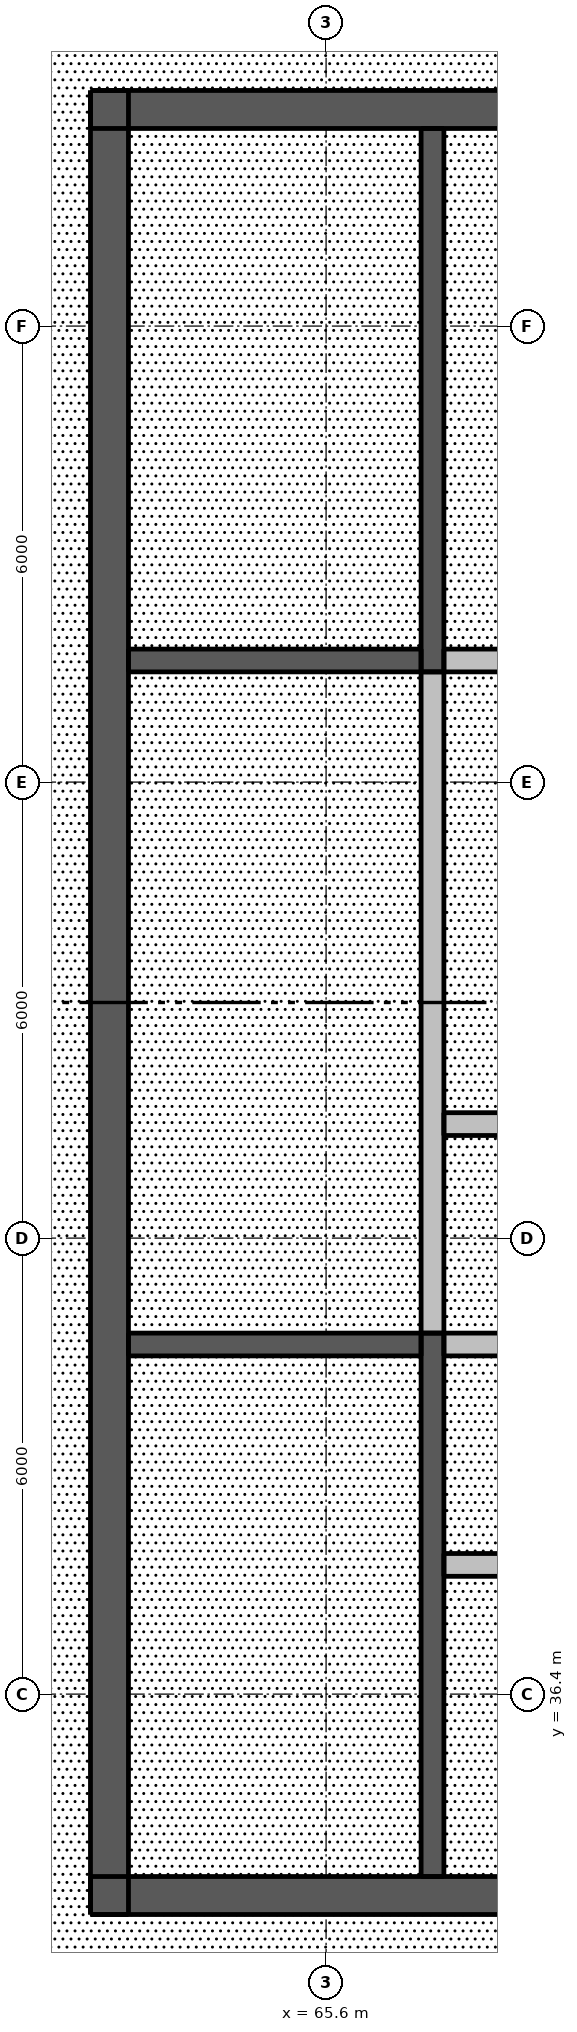
"""IFC4 building model, lengths in metres.
Left out: names, types, materials, properties, quantities, classifications, styles, units other than length and angle.
Written with IfcOpenShell. Run it as: python <this file> out.ifc"""

import sys

from ifc_helpers import new_model, si_unit, direction, frame, frame_2d, origin, place, context, subcontext, project, spatial, rectangle, extrude, element, fill, save


model = new_model("IFC4")
c1 = context("Model", 3, precision=1e-05, world=origin(), true_north=direction((0.0, 1.0)))
c2 = subcontext(c1, "Body", "Model", "MODEL_VIEW")
j1 = project(units=[si_unit("LENGTHUNIT", "METRE"), si_unit("PLANEANGLEUNIT", "RADIAN")], contexts=[c1])
p1 = place(None, origin())
s1 = spatial("IfcSite", under=j1, at=p1, CompositionType="ELEMENT")
p2 = place(p1, origin())
s2 = spatial("IfcBuilding", under=s1, at=p2, CompositionType="ELEMENT")
p3 = place(p2, frame((0.0, 0.0, 298.0)))
s3 = spatial("IfcBuildingStorey", under=s2, at=p3, CompositionType="ELEMENT", Elevation=298.0)
p4 = place(p3, frame((62.5, 33.75, 0.0), z_axis=(0.0, 0.0, 1.0), x_axis=(1.0, 0.0, 0.0)))
e1 = element("IfcWall", 1, at=p4, inside=s3, PredefinedType="SHEAR", context=c2, shape_type="SweptSolid", body=[
    extrude(rectangle(XDim=24.0, YDim=0.5, at=frame_2d((12.0, 0.0))), origin(), (0.0, 0.0, 1.0), 3.3),
])
p5 = place(p4, frame((1.875, 0.0, 0.0)))
e2 = element("IfcOpeningElement", 2, at=p5, cuts=e1, PredefinedType="OPENING", context=c2, shape_type="SweptSolid", body=[
    extrude(rectangle(XDim=1.1, YDim=2.1, at=frame_2d((0.55, 1.05))), frame((0.0, 0.26, 0.0), z_axis=(0.0, -1.0, 0.0), x_axis=(1.0, 0.0, 0.0)), (0.0, 0.0, 1.0), 0.52),
])
p6 = place(p4, frame((21.025, 0.0, 0.0)))
e3 = element("IfcOpeningElement", 3, at=p6, cuts=e1, PredefinedType="OPENING", context=c2, shape_type="SweptSolid", body=[
    extrude(rectangle(XDim=1.1, YDim=2.1, at=frame_2d((0.55, 1.05))), frame((0.0, 0.26, 0.0), z_axis=(0.0, -1.0, 0.0), x_axis=(1.0, 0.0, 0.0)), (0.0, 0.0, 1.0), 0.52),
])
p7 = place(p4, frame((11.55, 0.0, 0.0)))
e4 = element("IfcOpeningElement", 4, at=p7, cuts=e1, PredefinedType="OPENING", context=c2, shape_type="SweptSolid", body=[
    extrude(rectangle(XDim=0.9, YDim=2.1, at=frame_2d((0.45, 1.05))), frame((0.0, 0.26, 0.0), z_axis=(0.0, -1.0, 0.0), x_axis=(1.0, 0.0, 0.0)), (0.0, 0.0, 1.0), 0.52),
])
p8 = place(p3, frame((62.5, 57.25, 0.0), z_axis=(0.0, 0.0, 1.0), x_axis=(1.0, 0.0, 0.0)))
e5 = element("IfcWall", 5, at=p8, inside=s3, PredefinedType="SHEAR", context=c2, shape_type="SweptSolid", body=[
    extrude(rectangle(XDim=24.0, YDim=0.5, at=frame_2d((12.0, 0.0))), origin(), (0.0, 0.0, 1.0), 3.3),
])
p9 = place(p8, frame((21.025, 0.0, 0.0)))
e6 = element("IfcOpeningElement", 6, at=p9, cuts=e5, PredefinedType="OPENING", context=c2, shape_type="SweptSolid", body=[
    extrude(rectangle(XDim=1.1, YDim=2.1, at=frame_2d((0.55, 1.05))), frame((0.0, 0.26, 0.0), z_axis=(0.0, -1.0, 0.0), x_axis=(1.0, 0.0, 0.0)), (0.0, 0.0, 1.0), 0.52),
])
p10 = place(p8, frame((1.875, 0.0, 0.0)))
e7 = element("IfcOpeningElement", 7, at=p10, cuts=e5, PredefinedType="OPENING", context=c2, shape_type="SweptSolid", body=[
    extrude(rectangle(XDim=1.1, YDim=2.1, at=frame_2d((0.55, 1.05))), frame((0.0, 0.26, 0.0), z_axis=(0.0, -1.0, 0.0), x_axis=(1.0, 0.0, 0.0)), (0.0, 0.0, 1.0), 0.52),
])
p11 = place(p8, frame((11.55, 0.0, 0.0)))
e8 = element("IfcOpeningElement", 8, at=p11, cuts=e5, PredefinedType="OPENING", context=c2, shape_type="SweptSolid", body=[
    extrude(rectangle(XDim=0.9, YDim=2.1, at=frame_2d((0.45, 1.05))), frame((0.0, 0.26, 0.0), z_axis=(0.0, -1.0, 0.0), x_axis=(1.0, 0.0, 0.0)), (0.0, 0.0, 1.0), 0.52),
])
p12 = place(p3, frame((62.75, 33.5, 0.0), z_axis=(0.0, 0.0, 1.0), x_axis=(0.0, 1.0, 0.0)))
e9 = element("IfcWall", 9, at=p12, inside=s3, PredefinedType="SHEAR", context=c2, shape_type="SweptSolid", body=[
    extrude(rectangle(XDim=24.0, YDim=0.5, at=frame_2d((12.0, 0.0))), origin(), (0.0, 0.0, 1.0), 3.3),
])
p13 = place(p12, frame((11.55, 0.0, 0.0)))
e10 = element("IfcOpeningElement", 10, at=p13, cuts=e9, PredefinedType="OPENING", context=c2, shape_type="SweptSolid", body=[
    extrude(rectangle(XDim=0.9, YDim=2.1, at=frame_2d((0.45, 1.05))), frame((0.0, 0.26, 0.0), z_axis=(0.0, -1.0, 0.0), x_axis=(1.0, 0.0, 0.0)), (0.0, 0.0, 1.0), 0.52),
])
p14 = place(p3, frame((67.0, 34.0, 0.0), z_axis=(0.0, 0.0, 1.0), x_axis=(0.0, 1.0, 0.0)))
e11 = element("IfcWall", 11, at=p14, inside=s3, PredefinedType="SHEAR", context=c2, shape_type="SweptSolid", body=[
    extrude(rectangle(XDim=7.15, YDim=0.3, at=frame_2d((3.575, 0.0))), origin(), (0.0, 0.0, 1.0), 3.3),
])
p15 = place(p14, frame((0.2, 0.0, 0.0)))
e12 = element("IfcOpeningElement", 12, at=p15, cuts=e11, PredefinedType="OPENING", context=c2, shape_type="SweptSolid", body=[
    extrude(rectangle(XDim=1.1, YDim=2.1, at=frame_2d((0.55, 1.05))), frame((0.0, 0.16, 0.0), z_axis=(0.0, -1.0, 0.0), x_axis=(1.0, 0.0, 0.0)), (0.0, 0.0, 1.0), 0.32),
])
p16 = place(p3, frame((67.0, 41.15, 0.0), z_axis=(0.0, 0.0, 1.0), x_axis=(0.0, 1.0, 0.0)))
e13 = element("IfcWall", 13, at=p16, inside=s3, PredefinedType="PARTITIONING", context=c2, shape_type="SweptSolid", body=[
    extrude(rectangle(XDim=8.7, YDim=0.3, at=frame_2d((4.35, 0.0))), origin(), (0.0, 0.0, 1.0), 3.3),
])
p17 = place(p16, frame((3.9, 0.0, 0.0)))
e14 = element("IfcOpeningElement", 14, at=p17, cuts=e13, PredefinedType="OPENING", context=c2, shape_type="SweptSolid", body=[
    extrude(rectangle(XDim=0.9, YDim=2.1, at=frame_2d((0.45, 1.05))), frame((0.0, 0.16, 0.0), z_axis=(0.0, -1.0, 0.0), x_axis=(1.0, 0.0, 0.0)), (0.0, 0.0, 1.0), 0.32),
])
p18 = place(p3, frame((67.0, 49.85, 0.0), z_axis=(0.0, 0.0, 1.0), x_axis=(0.0, 1.0, 0.0)))
e15 = element("IfcWall", 15, at=p18, inside=s3, PredefinedType="SHEAR", context=c2, shape_type="SweptSolid", body=[
    extrude(rectangle(XDim=7.15, YDim=0.3, at=frame_2d((3.575, 0.0))), origin(), (0.0, 0.0, 1.0), 3.3),
])
p19 = place(p18, frame((5.85, 0.0, 0.0)))
e16 = element("IfcOpeningElement", 16, at=p19, cuts=e15, PredefinedType="OPENING", context=c2, shape_type="SweptSolid", body=[
    extrude(rectangle(XDim=1.1, YDim=2.1, at=frame_2d((0.55, 1.05))), frame((0.0, 0.16, 0.0), z_axis=(0.0, -1.0, 0.0), x_axis=(1.0, 0.0, 0.0)), (0.0, 0.0, 1.0), 0.32),
])
for number, where, z_axis, x_axis in (
    (17, (63.0, 41.0, 0.0), (0.0, 0.0, 1.0), (1.0, 0.0, 0.0)),
    (18, (63.0, 50.0, 0.0), (0.0, 0.0, 1.0), (1.0, 0.0, 0.0)),
):
    element("IfcWall", number, at=place(p3, frame(where, z_axis=z_axis, x_axis=x_axis)), inside=s3, PredefinedType="SHEAR", context=c2, shape_type="SweptSolid", body=[
        extrude(rectangle(XDim=3.85, YDim=0.3, at=frame_2d((1.925, 0.0))), origin(), (0.0, 0.0, 1.0), 3.3),
    ])
p20 = place(p3, frame((67.15, 50.0, 0.0), z_axis=(0.0, 0.0, 1.0), x_axis=(1.0, 0.0, 0.0)))
e19 = element("IfcWall", 19, at=p20, inside=s3, PredefinedType="PARTITIONING", context=c2, shape_type="SweptSolid", body=[
    extrude(rectangle(XDim=14.7, YDim=0.3, at=frame_2d((7.35, 0.0))), origin(), (0.0, 0.0, 1.0), 3.3),
])
p21 = place(p20, frame((6.9, 0.0, 0.0)))
e20 = element("IfcOpeningElement", 20, at=p21, cuts=e19, PredefinedType="OPENING", context=c2, shape_type="SweptSolid", body=[
    extrude(rectangle(XDim=0.9, YDim=2.1, at=frame_2d((0.45, 1.05))), frame((0.0, 0.16, 0.0), z_axis=(0.0, -1.0, 0.0), x_axis=(1.0, 0.0, 0.0)), (0.0, 0.0, 1.0), 0.32),
])
p22 = place(p3, frame((67.15, 43.9, 0.0), z_axis=(0.0, 0.0, 1.0), x_axis=(1.0, 0.0, 0.0)))
e21 = element("IfcWall", 21, at=p22, inside=s3, PredefinedType="PARTITIONING", context=c2, shape_type="SweptSolid", body=[
    extrude(rectangle(XDim=4.85, YDim=0.3, at=frame_2d((2.425, 0.0))), origin(), (0.0, 0.0, 1.0), 3.3),
])
p23 = place(p22, frame((1.9, 0.0, 0.0)))
e22 = element("IfcOpeningElement", 22, at=p23, cuts=e21, PredefinedType="OPENING", context=c2, shape_type="SweptSolid", body=[
    extrude(rectangle(XDim=0.9, YDim=2.1, at=frame_2d((0.45, 1.05))), frame((0.0, 0.16, 0.0), z_axis=(0.0, -1.0, 0.0), x_axis=(1.0, 0.0, 0.0)), (0.0, 0.0, 1.0), 0.32),
])
p24 = place(p3, frame((67.15, 38.1, 0.0), z_axis=(0.0, 0.0, 1.0), x_axis=(1.0, 0.0, 0.0)))
e23 = element("IfcWall", 23, at=p24, inside=s3, PredefinedType="PARTITIONING", context=c2, shape_type="SweptSolid", body=[
    extrude(rectangle(XDim=7.2, YDim=0.3, at=frame_2d((3.6, 0.0))), origin(), (0.0, 0.0, 1.0), 3.3),
])
p25 = place(p24, frame((0.55, 0.0, 0.0)))
e24 = element("IfcOpeningElement", 24, at=p25, cuts=e23, PredefinedType="OPENING", context=c2, shape_type="SweptSolid", body=[
    extrude(rectangle(XDim=1.1, YDim=2.1, at=frame_2d((0.55, 1.05))), frame((0.0, 0.16, 0.0), z_axis=(0.0, -1.0, 0.0), x_axis=(1.0, 0.0, 0.0)), (0.0, 0.0, 1.0), 0.32),
])
p26 = place(p24, frame((3.05, 0.0, 0.0)))
e25 = element("IfcOpeningElement", 25, at=p26, cuts=e23, PredefinedType="OPENING", context=c2, shape_type="SweptSolid", body=[
    extrude(rectangle(XDim=1.1, YDim=2.1, at=frame_2d((0.55, 1.05))), frame((0.0, 0.16, 0.0), z_axis=(0.0, -1.0, 0.0), x_axis=(1.0, 0.0, 0.0)), (0.0, 0.0, 1.0), 0.32),
])
p27 = place(p24, frame((5.5, 0.0, 0.0)))
e26 = element("IfcOpeningElement", 26, at=p27, cuts=e23, PredefinedType="OPENING", context=c2, shape_type="SweptSolid", body=[
    extrude(rectangle(XDim=1.2, YDim=2.1, at=frame_2d((0.6, 1.05))), frame((0.0, 0.16, 0.0), z_axis=(0.0, -1.0, 0.0), x_axis=(1.0, 0.0, 0.0)), (0.0, 0.0, 1.0), 0.32),
])
p28 = place(p3, frame((67.15, 41.0, 0.0), z_axis=(0.0, 0.0, 1.0), x_axis=(1.0, 0.0, 0.0)))
e27 = element("IfcWall", 27, at=p28, inside=s3, PredefinedType="PARTITIONING", context=c2, shape_type="SweptSolid", body=[
    extrude(rectangle(XDim=7.2, YDim=0.3, at=frame_2d((3.6, 0.0))), origin(), (0.0, 0.0, 1.0), 3.3),
])
p29 = place(p15, origin())
e28 = element("IfcDoor", 28, at=p29, inside=s3, OperationType="SINGLE_SWING_LEFT", PredefinedType="DOOR", context=c2, shape_type="SweptSolid", body=[
    extrude(rectangle(XDim=1.1, YDim=2.1, at=frame_2d((0.55, 1.05))), frame((0.0, 0.138, 0.0), z_axis=(0.0, -1.0, 0.0), x_axis=(1.0, 0.0, 0.0)), (0.0, 0.0, 1.0), 0.05),
])
fill(e12, e28)
p30 = place(p19, origin())
e29 = element("IfcDoor", 29, at=p30, inside=s3, OperationType="SINGLE_SWING_LEFT", PredefinedType="DOOR", context=c2, shape_type="SweptSolid", body=[
    extrude(rectangle(XDim=1.1, YDim=2.1, at=frame_2d((0.55, 1.05))), frame((0.0, 0.138, 0.0), z_axis=(0.0, -1.0, 0.0), x_axis=(1.0, 0.0, 0.0)), (0.0, 0.0, 1.0), 0.05),
])
fill(e16, e29)
p31 = place(p17, origin())
e30 = element("IfcDoor", 30, at=p31, inside=s3, OperationType="SINGLE_SWING_LEFT", PredefinedType="DOOR", context=c2, shape_type="SweptSolid", body=[
    extrude(rectangle(XDim=0.9, YDim=2.1, at=frame_2d((0.45, 1.05))), frame((0.0, 0.138, 0.0), z_axis=(0.0, -1.0, 0.0), x_axis=(1.0, 0.0, 0.0)), (0.0, 0.0, 1.0), 0.05),
])
fill(e14, e30)
p32 = place(p5, origin())
e31 = element("IfcDoor", 31, at=p32, inside=s3, OperationType="SINGLE_SWING_LEFT", PredefinedType="DOOR", context=c2, shape_type="SweptSolid", body=[
    extrude(rectangle(XDim=1.1, YDim=2.1, at=frame_2d((0.55, 1.05))), frame((0.0, 0.237, 0.0), z_axis=(0.0, -1.0, 0.0), x_axis=(1.0, 0.0, 0.0)), (0.0, 0.0, 1.0), 0.05),
])
fill(e2, e31)
p33 = place(p10, origin())
e32 = element("IfcDoor", 32, at=p33, inside=s3, OperationType="SINGLE_SWING_LEFT", PredefinedType="DOOR", context=c2, shape_type="SweptSolid", body=[
    extrude(rectangle(XDim=1.1, YDim=2.1, at=frame_2d((0.55, 1.05))), frame((0.0, -0.188, 0.0), z_axis=(0.0, -1.0, 0.0), x_axis=(1.0, 0.0, 0.0)), (0.0, 0.0, 1.0), 0.05),
])
fill(e7, e32)
p34 = place(p13, origin())
e33 = element("IfcDoor", 33, at=p34, inside=s3, OperationType="SINGLE_SWING_LEFT", PredefinedType="DOOR", context=c2, shape_type="SweptSolid", body=[
    extrude(rectangle(XDim=0.9, YDim=2.1, at=frame_2d((0.45, 1.05))), frame((0.0, -0.188, 0.0), z_axis=(0.0, -1.0, 0.0), x_axis=(1.0, 0.0, 0.0)), (0.0, 0.0, 1.0), 0.05),
])
fill(e10, e33)
p35 = place(p25, origin())
e34 = element("IfcDoor", 34, at=p35, inside=s3, OperationType="DOUBLE_DOOR_SLIDING", PredefinedType="DOOR", context=c2, shape_type="SweptSolid", body=[
    extrude(rectangle(XDim=1.1, YDim=2.1, at=frame_2d((0.55, 1.05))), frame((0.0, 0.025, 0.0), z_axis=(0.0, -1.0, 0.0), x_axis=(1.0, 0.0, 0.0)), (0.0, 0.0, 1.0), 0.05),
])
fill(e24, e34)
save(model, sys.argv[1])
